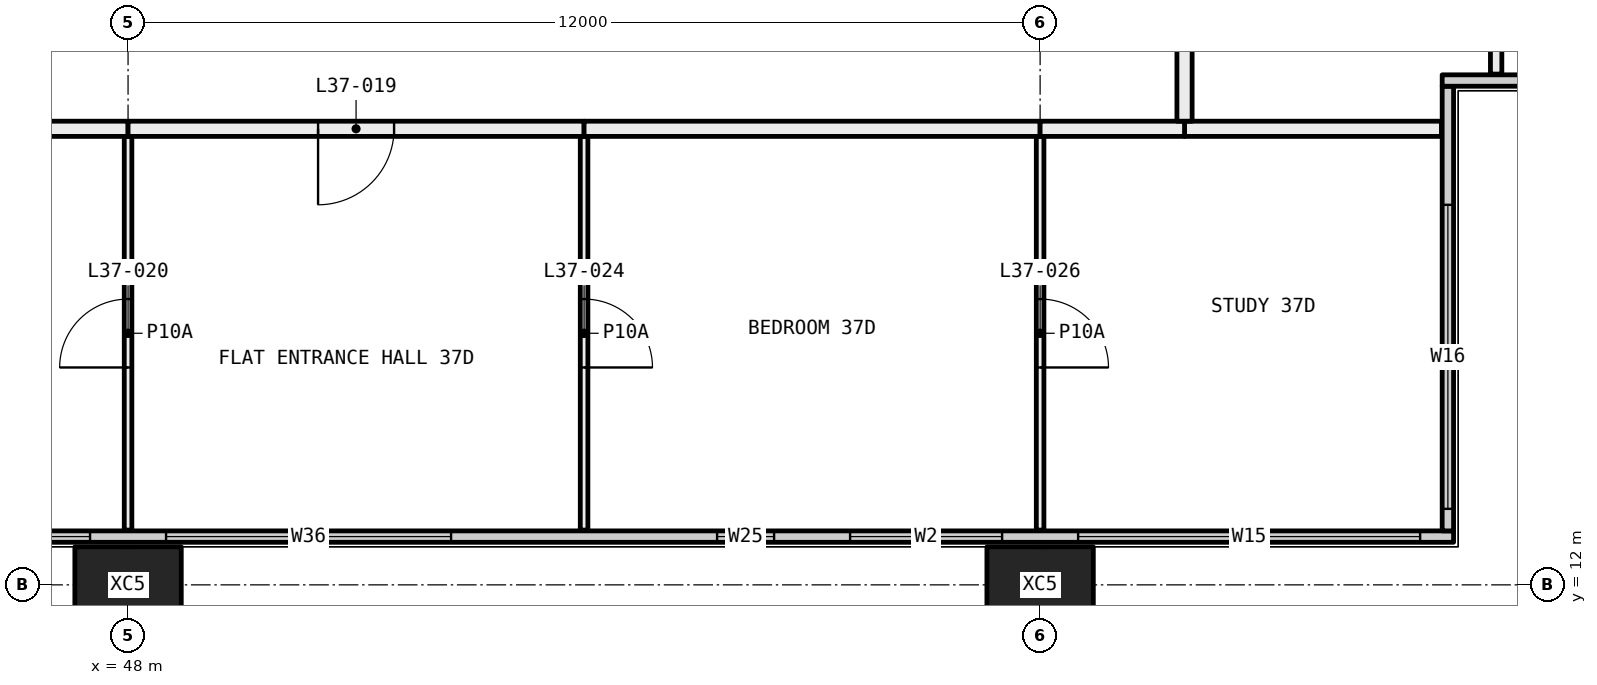
"""IFC4 building model, lengths in metres.
Left out: names, types, materials, properties, quantities, classifications, styles, units other than length and angle.
Written with IfcOpenShell. Run it as: python <this file> out.ifc"""

import sys

from ifc_helpers import new_model, si_unit, direction, frame, frame_2d, origin, origin_2d, place, context, subcontext, project, spatial, rectangle, hollow_rectangle, extrude, element, fill, save


model = new_model("IFC4")
c1 = context("Model", 3, precision=1e-05, world=origin(), true_north=direction((0.0, 1.0)))
c2 = subcontext(c1, "Body", "Model", "MODEL_VIEW")
j1 = project(units=[si_unit("LENGTHUNIT", "METRE"), si_unit("PLANEANGLEUNIT", "RADIAN")], contexts=[c1])
p1 = place(None, origin())
s1 = spatial("IfcSite", under=j1, at=p1, CompositionType="ELEMENT")
p2 = place(p1, origin())
s2 = spatial("IfcBuilding", under=s1, at=p2, CompositionType="ELEMENT")
p3 = place(p2, frame((0.0, 0.0, 141.45)))
s3 = spatial("IfcBuildingStorey", under=s2, at=p3, CompositionType="ELEMENT", Elevation=141.45)
for number, where, z_axis, x_axis in (
    (1, (48.0, 12.0, -0.4), (0.0, 0.0, 1.0), (1.0, 0.0, 0.0)),
    (2, (60.0, 12.0, -0.4), (0.0, 0.0, 1.0), (1.0, 0.0, 0.0)),
):
    element("IfcColumn", number, at=place(p3, frame(where, z_axis=z_axis, x_axis=x_axis)), inside=s3, PredefinedType="COLUMN", context=c2, shape_type="SweptSolid", body=[
        extrude(hollow_rectangle(XDim=1.4, YDim=1.0, WallThickness=0.055, at=origin_2d()), origin(), (0.0, 0.0, 1.0), 3.45),
    ])
p4 = place(p3, frame((6.56, 12.635, 0.0), z_axis=(0.0, 0.0, 1.0), x_axis=(1.0, 0.0, 0.0)))
e3 = element("IfcWall", 3, at=p4, inside=s3, PredefinedType="ELEMENTEDWALL", context=c2, shape_type="SweptSolid", body=[
    extrude(rectangle(XDim=58.88, YDim=0.15, at=frame_2d((29.44, 0.0))), origin(), (0.0, 0.0, 1.0), 3.05),
])
p5 = place(p4, frame((0.44, 0.0, 0.45)))
e4 = element("IfcOpeningElement", 4, at=p5, cuts=e3, PredefinedType="OPENING", context=c2, shape_type="SweptSolid", body=[
    extrude(rectangle(XDim=4.5, YDim=2.55, at=frame_2d((2.25, 1.275))), frame((0.0, 0.085, 0.0), z_axis=(0.0, -1.0, 0.0), x_axis=(1.0, 0.0, 0.0)), (0.0, 0.0, 1.0), 0.17),
])
p6 = place(p4, frame((5.94, 0.0, 0.45)))
e5 = element("IfcOpeningElement", 5, at=p6, cuts=e3, PredefinedType="OPENING", context=c2, shape_type="SweptSolid", body=[
    extrude(rectangle(XDim=3.75, YDim=2.55, at=frame_2d((1.875, 1.275))), frame((0.0, 0.085, 0.0), z_axis=(0.0, -1.0, 0.0), x_axis=(1.0, 0.0, 0.0)), (0.0, 0.0, 1.0), 0.17),
])
p7 = place(p4, frame((13.19, 0.0, 0.45)))
e6 = element("IfcOpeningElement", 6, at=p7, cuts=e3, PredefinedType="OPENING", context=c2, shape_type="SweptSolid", body=[
    extrude(rectangle(XDim=3.75, YDim=2.55, at=frame_2d((1.875, 1.275))), frame((0.0, 0.085, 0.0), z_axis=(0.0, -1.0, 0.0), x_axis=(1.0, 0.0, 0.0)), (0.0, 0.0, 1.0), 0.17),
])
p8 = place(p4, frame((17.94, 0.0, 0.45)))
e7 = element("IfcOpeningElement", 7, at=p8, cuts=e3, PredefinedType="OPENING", context=c2, shape_type="SweptSolid", body=[
    extrude(rectangle(XDim=3.75, YDim=2.55, at=frame_2d((1.875, 1.275))), frame((0.0, 0.085, 0.0), z_axis=(0.0, -1.0, 0.0), x_axis=(1.0, 0.0, 0.0)), (0.0, 0.0, 1.0), 0.17),
])
p9 = place(p4, frame((25.19, 0.0, 0.45)))
e8 = element("IfcOpeningElement", 8, at=p9, cuts=e3, PredefinedType="OPENING", context=c2, shape_type="SweptSolid", body=[
    extrude(rectangle(XDim=0.75, YDim=2.55, at=frame_2d((0.375, 1.275))), frame((0.0, 0.085, 0.0), z_axis=(0.0, -1.0, 0.0), x_axis=(1.0, 0.0, 0.0)), (0.0, 0.0, 1.0), 0.17),
])
p10 = place(p4, frame((26.94, 0.0, 0.45)))
e9 = element("IfcOpeningElement", 9, at=p10, cuts=e3, PredefinedType="OPENING", context=c2, shape_type="SweptSolid", body=[
    extrude(rectangle(XDim=2.0, YDim=2.55, at=frame_2d((1.0, 1.275))), frame((0.0, 0.085, 0.0), z_axis=(0.0, -1.0, 0.0), x_axis=(1.0, 0.0, 0.0)), (0.0, 0.0, 1.0), 0.17),
])
p11 = place(p4, frame((29.94, 0.0, 0.45)))
e10 = element("IfcOpeningElement", 10, at=p11, cuts=e3, PredefinedType="OPENING", context=c2, shape_type="SweptSolid", body=[
    extrude(rectangle(XDim=3.75, YDim=2.55, at=frame_2d((1.875, 1.275))), frame((0.0, 0.085, 0.0), z_axis=(0.0, -1.0, 0.0), x_axis=(1.0, 0.0, 0.0)), (0.0, 0.0, 1.0), 0.17),
])
p12 = place(p4, frame((37.19, 0.0, 0.45)))
e11 = element("IfcOpeningElement", 11, at=p12, cuts=e3, PredefinedType="OPENING", context=c2, shape_type="SweptSolid", body=[
    extrude(rectangle(XDim=3.75, YDim=2.55, at=frame_2d((1.875, 1.275))), frame((0.0, 0.085, 0.0), z_axis=(0.0, -1.0, 0.0), x_axis=(1.0, 0.0, 0.0)), (0.0, 0.0, 1.0), 0.17),
])
p13 = place(p4, frame((41.94, 0.0, 0.45)))
e12 = element("IfcOpeningElement", 12, at=p13, cuts=e3, PredefinedType="OPENING", context=c2, shape_type="SweptSolid", body=[
    extrude(rectangle(XDim=3.75, YDim=2.55, at=frame_2d((1.875, 1.275))), frame((0.0, 0.085, 0.0), z_axis=(0.0, -1.0, 0.0), x_axis=(1.0, 0.0, 0.0)), (0.0, 0.0, 1.0), 0.17),
])
p14 = place(p4, frame((49.19, 0.0, 0.45)))
e13 = element("IfcOpeningElement", 13, at=p14, cuts=e3, PredefinedType="OPENING", context=c2, shape_type="SweptSolid", body=[
    extrude(rectangle(XDim=0.75, YDim=2.55, at=frame_2d((0.375, 1.275))), frame((0.0, 0.085, 0.0), z_axis=(0.0, -1.0, 0.0), x_axis=(1.0, 0.0, 0.0)), (0.0, 0.0, 1.0), 0.17),
])
p15 = place(p4, frame((50.94, 0.0, 0.45)))
e14 = element("IfcOpeningElement", 14, at=p15, cuts=e3, PredefinedType="OPENING", context=c2, shape_type="SweptSolid", body=[
    extrude(rectangle(XDim=2.0, YDim=2.55, at=frame_2d((1.0, 1.275))), frame((0.0, 0.085, 0.0), z_axis=(0.0, -1.0, 0.0), x_axis=(1.0, 0.0, 0.0)), (0.0, 0.0, 1.0), 0.17),
])
p16 = place(p4, frame((53.94, 0.0, 0.45)))
e15 = element("IfcOpeningElement", 15, at=p16, cuts=e3, PredefinedType="OPENING", context=c2, shape_type="SweptSolid", body=[
    extrude(rectangle(XDim=4.5, YDim=2.55, at=frame_2d((2.25, 1.275))), frame((0.0, 0.085, 0.0), z_axis=(0.0, -1.0, 0.0), x_axis=(1.0, 0.0, 0.0)), (0.0, 0.0, 1.0), 0.17),
])
p17 = place(p3, frame((65.365, 12.71, 0.0), z_axis=(0.0, 0.0, 1.0), x_axis=(0.0, 1.0, 0.0)))
e16 = element("IfcWall", 16, at=p17, inside=s3, PredefinedType="ELEMENTEDWALL", context=c2, shape_type="SweptSolid", body=[
    extrude(rectangle(XDim=5.85, YDim=0.15, at=frame_2d((2.925, 0.0))), origin(), (0.0, 0.0, 1.0), 3.05),
])
p18 = place(p17, frame((0.29, 0.0, 0.45)))
e17 = element("IfcOpeningElement", 17, at=p18, cuts=e16, PredefinedType="OPENING", context=c2, shape_type="SweptSolid", body=[
    extrude(rectangle(XDim=4.0, YDim=2.55, at=frame_2d((2.0, 1.275))), frame((0.0, 0.085, 0.0), z_axis=(0.0, -1.0, 0.0), x_axis=(1.0, 0.0, 0.0)), (0.0, 0.0, 1.0), 0.17),
])
p19 = place(p3, frame((65.29, 18.635, 0.0), z_axis=(0.0, 0.0, 1.0), x_axis=(1.0, 0.0, 0.0)))
e18 = element("IfcWall", 18, at=p19, inside=s3, PredefinedType="ELEMENTEDWALL", context=c2, shape_type="SweptSolid", body=[
    extrude(rectangle(XDim=6.15, YDim=0.15, at=frame_2d((3.075, 0.0))), origin(), (0.0, 0.0, 1.0), 3.05),
])
p20 = place(p19, frame((1.71, 0.0, 0.45)))
e19 = element("IfcOpeningElement", 19, at=p20, cuts=e18, PredefinedType="OPENING", context=c2, shape_type="SweptSolid", body=[
    extrude(rectangle(XDim=4.0, YDim=2.55, at=frame_2d((2.0, 1.275))), frame((0.0, 0.085, 0.0), z_axis=(0.0, -1.0, 0.0), x_axis=(1.0, 0.0, 0.0)), (0.0, 0.0, 1.0), 0.17),
])
p21 = place(p3, frame((48.0, 12.72, 0.0), z_axis=(0.0, 0.0, 1.0), x_axis=(0.0, 1.0, 0.0)))
e20 = element("IfcWall", 20, at=p21, inside=s3, PredefinedType="PARTITIONING", context=c2, shape_type="SweptSolid", body=[
    extrude(rectangle(XDim=5.18, YDim=0.1, at=frame_2d((2.59, 0.0))), origin(), (0.0, 0.0, 1.0), 3.05),
])
p22 = place(p21, frame((2.14, 0.0, 0.0)))
e21 = element("IfcOpeningElement", 21, at=p22, cuts=e20, PredefinedType="OPENING", context=c2, shape_type="SweptSolid", body=[
    extrude(rectangle(XDim=0.9, YDim=2.1, at=frame_2d((0.45, 1.05))), frame((0.0, 0.06, 0.0), z_axis=(0.0, -1.0, 0.0), x_axis=(1.0, 0.0, 0.0)), (0.0, 0.0, 1.0), 0.12),
])
p23 = place(p3, frame((48.0, 18.0, 0.0), z_axis=(0.0, 0.0, 1.0), x_axis=(-1.0, 0.0, 0.0)))
e22 = element("IfcWall", 22, at=p23, inside=s3, PredefinedType="PARTITIONING", context=c2, shape_type="SweptSolid", body=[
    extrude(rectangle(XDim=1.9, YDim=0.2, at=frame_2d((0.95, 0.0))), origin(), (0.0, 0.0, 1.0), 3.05),
])
p24 = place(p3, frame((54.0, 12.72, 0.0), z_axis=(0.0, 0.0, 1.0), x_axis=(0.0, 1.0, 0.0)))
e23 = element("IfcWall", 23, at=p24, inside=s3, PredefinedType="PARTITIONING", context=c2, shape_type="SweptSolid", body=[
    extrude(rectangle(XDim=5.18, YDim=0.1, at=frame_2d((2.59, 0.0))), origin(), (0.0, 0.0, 1.0), 3.05),
])
p25 = place(p24, frame((2.14, 0.0, 0.0)))
e24 = element("IfcOpeningElement", 24, at=p25, cuts=e23, PredefinedType="OPENING", context=c2, shape_type="SweptSolid", body=[
    extrude(rectangle(XDim=0.9, YDim=2.1, at=frame_2d((0.45, 1.05))), frame((0.0, 0.06, 0.0), z_axis=(0.0, -1.0, 0.0), x_axis=(1.0, 0.0, 0.0)), (0.0, 0.0, 1.0), 0.12),
])
p26 = place(p3, frame((54.0, 18.0, 0.0), z_axis=(0.0, 0.0, 1.0), x_axis=(-1.0, 0.0, 0.0)))
e25 = element("IfcWall", 25, at=p26, inside=s3, PredefinedType="PARTITIONING", context=c2, shape_type="SweptSolid", body=[
    extrude(rectangle(XDim=6.0, YDim=0.2, at=frame_2d((3.0, 0.0))), origin(), (0.0, 0.0, 1.0), 3.05),
])
p27 = place(p26, frame((2.5, 0.0, 0.0)))
e26 = element("IfcOpeningElement", 26, at=p27, cuts=e25, PredefinedType="OPENING", context=c2, shape_type="SweptSolid", body=[
    extrude(rectangle(XDim=1.0, YDim=2.1, at=frame_2d((0.5, 1.05))), frame((0.0, 0.11, 0.0), z_axis=(0.0, -1.0, 0.0), x_axis=(1.0, 0.0, 0.0)), (0.0, 0.0, 1.0), 0.22),
])
p28 = place(p3, frame((60.0, 12.72, 0.0), z_axis=(0.0, 0.0, 1.0), x_axis=(0.0, 1.0, 0.0)))
e27 = element("IfcWall", 27, at=p28, inside=s3, PredefinedType="PARTITIONING", context=c2, shape_type="SweptSolid", body=[
    extrude(rectangle(XDim=5.18, YDim=0.1, at=frame_2d((2.59, 0.0))), origin(), (0.0, 0.0, 1.0), 3.05),
])
p29 = place(p28, frame((2.14, 0.0, 0.0)))
e28 = element("IfcOpeningElement", 28, at=p29, cuts=e27, PredefinedType="OPENING", context=c2, shape_type="SweptSolid", body=[
    extrude(rectangle(XDim=0.9, YDim=2.1, at=frame_2d((0.45, 1.05))), frame((0.0, 0.06, 0.0), z_axis=(0.0, -1.0, 0.0), x_axis=(1.0, 0.0, 0.0)), (0.0, 0.0, 1.0), 0.12),
])
p30 = place(p3, frame((60.0, 18.0, 0.0), z_axis=(0.0, 0.0, 1.0), x_axis=(-1.0, 0.0, 0.0)))
e29 = element("IfcWall", 29, at=p30, inside=s3, PredefinedType="PARTITIONING", context=c2, shape_type="SweptSolid", body=[
    extrude(rectangle(XDim=6.0, YDim=0.2, at=frame_2d((3.0, 0.0))), origin(), (0.0, 0.0, 1.0), 3.05),
])
p31 = place(p3, frame((65.28, 18.0, 0.0), z_axis=(0.0, 0.0, 1.0), x_axis=(-1.0, 0.0, 0.0)))
e30 = element("IfcWall", 30, at=p31, inside=s3, PredefinedType="PARTITIONING", context=c2, shape_type="SweptSolid", body=[
    extrude(rectangle(XDim=3.38, YDim=0.2, at=frame_2d((1.69, 0.0))), origin(), (0.0, 0.0, 1.0), 3.05),
])
p32 = place(p3, frame((61.9, 18.0, 0.0), z_axis=(0.0, 0.0, 1.0), x_axis=(-1.0, 0.0, 0.0)))
e31 = element("IfcWall", 31, at=p32, inside=s3, PredefinedType="PARTITIONING", context=c2, shape_type="SweptSolid", body=[
    extrude(rectangle(XDim=1.9, YDim=0.2, at=frame_2d((0.95, 0.0))), origin(), (0.0, 0.0, 1.0), 3.05),
])
p33 = place(p3, frame((66.0, 21.0, 0.0), z_axis=(0.0, 0.0, 1.0), x_axis=(0.0, -1.0, 0.0)))
e32 = element("IfcWall", 32, at=p33, inside=s3, PredefinedType="PARTITIONING", context=c2, shape_type="SweptSolid", body=[
    extrude(rectangle(XDim=2.28, YDim=0.15, at=frame_2d((1.14, 0.0))), origin(), (0.0, 0.0, 1.0), 3.05),
])
p34 = place(p3, frame((61.9, 21.0, 0.0), z_axis=(0.0, 0.0, 1.0), x_axis=(0.0, -1.0, 0.0)))
e33 = element("IfcWall", 33, at=p34, inside=s3, PredefinedType="PARTITIONING", context=c2, shape_type="SweptSolid", body=[
    extrude(rectangle(XDim=2.9, YDim=0.2, at=frame_2d((1.45, 0.0))), origin(), (0.0, 0.0, 1.0), 3.05),
])
p35 = place(p12, origin())
e34 = element("IfcWindow", 34, at=p35, inside=s3, PartitioningType="SINGLE_PANEL", PredefinedType="WINDOW", context=c2, shape_type="SweptSolid", body=[
    extrude(rectangle(XDim=3.75, YDim=2.55, at=frame_2d((1.875, 1.275))), frame((0.0, 0.03, 0.0), z_axis=(0.0, -1.0, 0.0), x_axis=(1.0, 0.0, 0.0)), (0.0, 0.0, 1.0), 0.06),
])
fill(e11, e34)
p36 = place(p13, origin())
e35 = element("IfcWindow", 35, at=p36, inside=s3, PartitioningType="SINGLE_PANEL", PredefinedType="WINDOW", context=c2, shape_type="SweptSolid", body=[
    extrude(rectangle(XDim=3.75, YDim=2.55, at=frame_2d((1.875, 1.275))), frame((0.0, 0.03, 0.0), z_axis=(0.0, -1.0, 0.0), x_axis=(1.0, 0.0, 0.0)), (0.0, 0.0, 1.0), 0.06),
])
fill(e12, e35)
p37 = place(p14, origin())
e36 = element("IfcWindow", 36, at=p37, inside=s3, PartitioningType="SINGLE_PANEL", PredefinedType="WINDOW", context=c2, shape_type="SweptSolid", body=[
    extrude(rectangle(XDim=0.75, YDim=2.55, at=frame_2d((0.375, 1.275))), frame((0.0, 0.03, 0.0), z_axis=(0.0, -1.0, 0.0), x_axis=(1.0, 0.0, 0.0)), (0.0, 0.0, 1.0), 0.06),
])
fill(e13, e36)
p38 = place(p15, origin())
e37 = element("IfcWindow", 37, at=p38, inside=s3, PartitioningType="SINGLE_PANEL", PredefinedType="WINDOW", context=c2, shape_type="SweptSolid", body=[
    extrude(rectangle(XDim=2.0, YDim=2.55, at=frame_2d((1.0, 1.275))), frame((0.0, 0.03, 0.0), z_axis=(0.0, -1.0, 0.0), x_axis=(1.0, 0.0, 0.0)), (0.0, 0.0, 1.0), 0.06),
])
fill(e14, e37)
p39 = place(p16, origin())
e38 = element("IfcWindow", 38, at=p39, inside=s3, PartitioningType="SINGLE_PANEL", PredefinedType="WINDOW", context=c2, shape_type="SweptSolid", body=[
    extrude(rectangle(XDim=4.5, YDim=2.55, at=frame_2d((2.25, 1.275))), frame((0.0, 0.03, 0.0), z_axis=(0.0, -1.0, 0.0), x_axis=(1.0, 0.0, 0.0)), (0.0, 0.0, 1.0), 0.06),
])
fill(e15, e38)
p40 = place(p18, origin())
e39 = element("IfcWindow", 39, at=p40, inside=s3, PartitioningType="SINGLE_PANEL", PredefinedType="WINDOW", context=c2, shape_type="SweptSolid", body=[
    extrude(rectangle(XDim=4.0, YDim=2.55, at=frame_2d((2.0, 1.275))), frame((0.0, 0.03, 0.0), z_axis=(0.0, -1.0, 0.0), x_axis=(1.0, 0.0, 0.0)), (0.0, 0.0, 1.0), 0.06),
])
fill(e17, e39)
p41 = place(p27, origin())
e40 = element("IfcDoor", 40, at=p41, inside=s3, OperationType="SINGLE_SWING_LEFT", PredefinedType="DOOR", context=c2, shape_type="SweptSolid", body=[
    extrude(rectangle(XDim=1.0, YDim=2.1, at=frame_2d((0.5, 1.05))), frame((0.0, 0.025, 0.0), z_axis=(0.0, -1.0, 0.0), x_axis=(1.0, 0.0, 0.0)), (0.0, 0.0, 1.0), 0.05),
])
fill(e26, e40)
p42 = place(p22, origin())
e41 = element("IfcDoor", 41, at=p42, inside=s3, OperationType="SINGLE_SWING_RIGHT", PredefinedType="DOOR", context=c2, shape_type="SweptSolid", body=[
    extrude(rectangle(XDim=0.9, YDim=2.1, at=frame_2d((0.45, 1.05))), frame((0.0, 0.025, 0.0), z_axis=(0.0, -1.0, 0.0), x_axis=(1.0, 0.0, 0.0)), (0.0, 0.0, 1.0), 0.05),
])
fill(e21, e41)
p43 = place(p25, frame((0.9, 0.0, 0.0), x_axis=(-1.0, 0.0, 0.0)))
e42 = element("IfcDoor", 42, at=p43, inside=s3, OperationType="SINGLE_SWING_LEFT", PredefinedType="DOOR", context=c2, shape_type="SweptSolid", body=[
    extrude(rectangle(XDim=0.9, YDim=2.1, at=frame_2d((0.45, 1.05))), frame((0.0, 0.025, 0.0), z_axis=(0.0, -1.0, 0.0), x_axis=(1.0, 0.0, 0.0)), (0.0, 0.0, 1.0), 0.05),
])
fill(e24, e42)
p44 = place(p29, frame((0.9, 0.0, 0.0), x_axis=(-1.0, 0.0, 0.0)))
e43 = element("IfcDoor", 43, at=p44, inside=s3, OperationType="SINGLE_SWING_LEFT", PredefinedType="DOOR", context=c2, shape_type="SweptSolid", body=[
    extrude(rectangle(XDim=0.9, YDim=2.1, at=frame_2d((0.45, 1.05))), frame((0.0, 0.025, 0.0), z_axis=(0.0, -1.0, 0.0), x_axis=(1.0, 0.0, 0.0)), (0.0, 0.0, 1.0), 0.05),
])
fill(e28, e43)
save(model, sys.argv[1])
